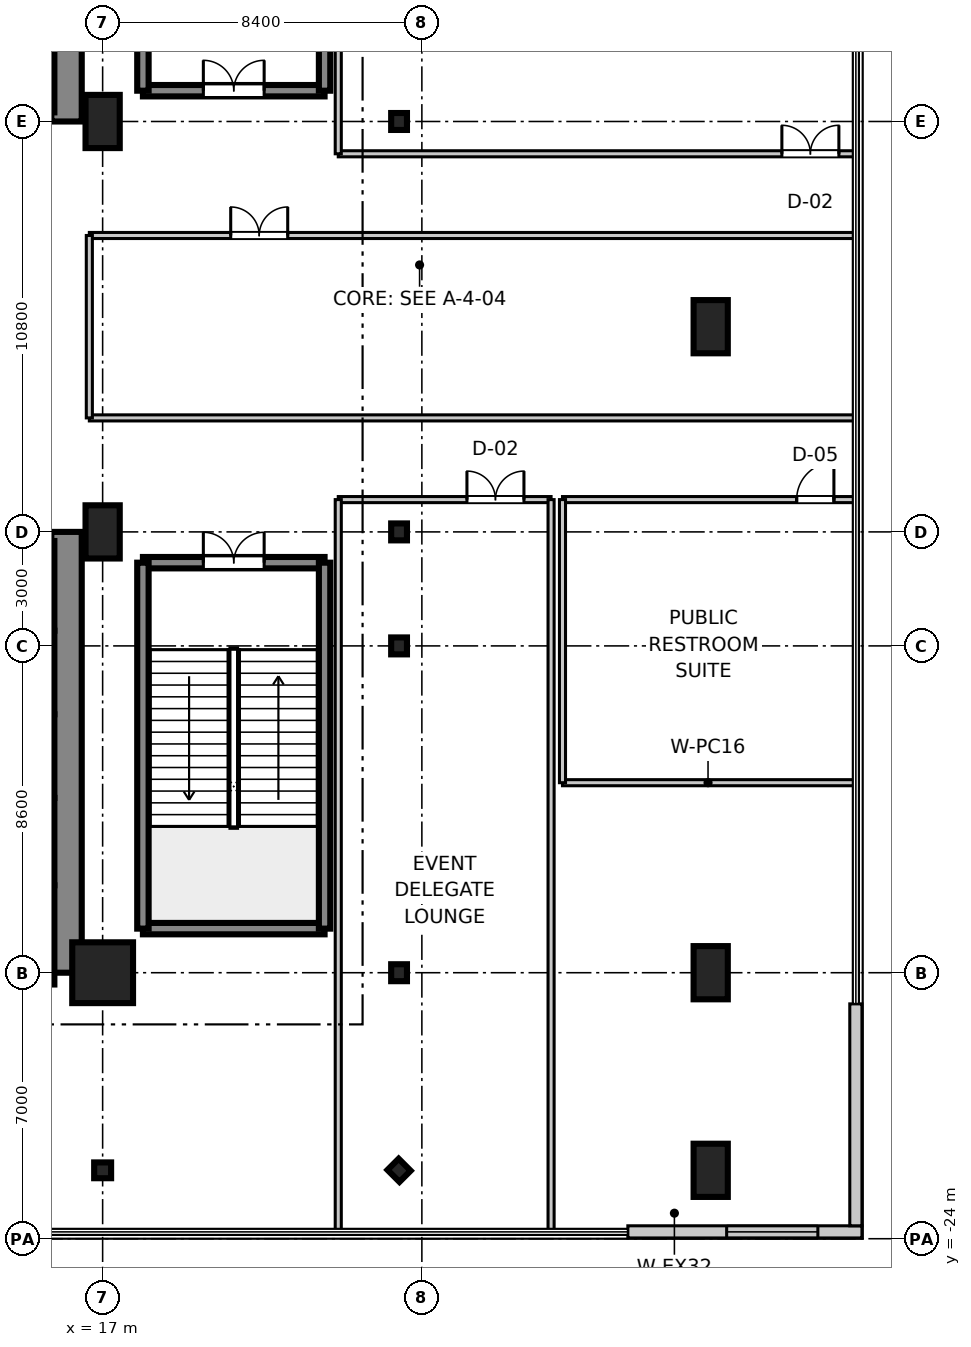
"""IFC4 building model, lengths in metres.
Left out: names, types, materials, properties, quantities, classifications, styles, units other than length and angle.
Written with IfcOpenShell. Run it as: python <this file> out.ifc"""

import sys

from ifc_helpers import new_model, si_unit, direction, frame, frame_2d, origin, origin_2d, place, context, subcontext, project, spatial, rectangle, i_section, extrude, source, transform, mapped, element, fill, save


model = new_model("IFC4")
c1 = context("Model", 3, precision=1e-05, world=origin(), true_north=direction((0.0, 1.0)))
c2 = subcontext(c1, "Body", "Model", "MODEL_VIEW")
j1 = project(units=[si_unit("LENGTHUNIT", "METRE"), si_unit("PLANEANGLEUNIT", "RADIAN")], contexts=[c1])
p1 = place(None, origin())
s1 = spatial("IfcSite", under=j1, at=p1, CompositionType="ELEMENT")
p2 = place(p1, origin())
s2 = spatial("IfcBuilding", under=s1, at=p2, CompositionType="ELEMENT")
p3 = place(p2, frame((0.0, 0.0, 10.8)))
s3 = spatial("IfcBuildingStorey", under=s2, at=p3, CompositionType="ELEMENT", Elevation=10.8)
m1 = source(origin(), c2, "Body", "SweptSolid", [
    extrude(rectangle(XDim=1.6, YDim=1.6, at=origin_2d()), origin(), (0.0, 0.0, 1.0), 5.355),
])
p4 = place(p3, frame((17.0, -17.0, 0.0), z_axis=(0.0, 0.0, 1.0), x_axis=(1.0, 0.0, 0.0)))
e1 = element("IfcColumn", 1, at=p4, inside=s3, PredefinedType="COLUMN", context=c2, shape_type="MappedRepresentation", body=[
    mapped(m1, transform((0.0, 0.0, 0.0), scale=1.0)),
])
m2 = source(origin(), c2, "Body", "SweptSolid", [
    extrude(rectangle(XDim=0.9, YDim=1.4, at=origin_2d()), origin(), (0.0, 0.0, 1.0), 5.355),
])
for number, where, z_axis, x_axis in (
    (2, (17.0, -5.4, 0.0), (0.0, 0.0, 1.0), (1.0, 0.0, 0.0)),
    (3, (17.0, 5.4, 0.0), (0.0, 0.0, 1.0), (1.0, 0.0, 0.0)),
    (4, (33.0, -22.2, 0.0), (0.0, 0.0, 1.0), (1.0, 0.0, 0.0)),
    (5, (33.0, -17.0, 0.0), (0.0, 0.0, 1.0), (1.0, 0.0, 0.0)),
    (6, (33.0, 0.0, 0.0), (0.0, 0.0, 1.0), (1.0, 0.0, 0.0)),
):
    element("IfcColumn", number, at=place(p3, frame(where, z_axis=z_axis, x_axis=x_axis)), inside=s3, PredefinedType="PILASTER", context=c2, shape_type="MappedRepresentation", body=[
        mapped(m2, transform((0.0, 0.0, 0.0), scale=1.0)),
    ])
m3 = source(origin(), c2, "Body", "SweptSolid", [
    extrude(i_section(OverallWidth=0.416, OverallDepth=0.446, WebThickness=0.025, FlangeThickness=0.04, at=origin_2d()), origin(), (0.0, 0.0, 1.0), 5.355),
])
for number, where, z_axis, x_axis in (
    (7, (24.8, -17.0, 0.0), (0.0, 0.0, 1.0), (1.0, 0.0, 0.0)),
    (8, (24.8, -8.4, 0.0), (0.0, 0.0, 1.0), (1.0, 0.0, 0.0)),
    (9, (24.8, -5.4, 0.0), (0.0, 0.0, 1.0), (1.0, 0.0, 0.0)),
    (10, (24.8, 5.4, 0.0), (0.0, 0.0, 1.0), (1.0, 0.0, 0.0)),
    (11, (17.0, -22.2, 0.0), (0.0, 0.0, 1.0), (0.0, 1.0, 0.0)),
    (12, (24.8, -22.2, 0.0), (0.0, 0.0, 1.0), (0.707, 0.707, 0.0)),
):
    element("IfcColumn", number, at=place(p3, frame(where, z_axis=z_axis, x_axis=x_axis)), inside=s3, PredefinedType="COLUMN", context=c2, shape_type="MappedRepresentation", body=[
        mapped(m3, transform((0.0, 0.0, 0.0), scale=1.0)),
    ])
m4 = source(origin(), c2, "Body", "SweptSolid", [
    extrude(rectangle(XDim=11.6, YDim=0.8, at=frame_2d((5.8, 0.0))), origin(), (0.0, 0.0, 1.0), 5.06),
])
for number, where, z_axis, x_axis in (
    (13, (16.05, 5.4, 0.0), (0.0, 0.0, 1.0), (0.0, 1.0, 0.0)),
    (14, (16.05, -17.0, 0.0), (0.0, 0.0, 1.0), (0.0, 1.0, 0.0)),
):
    element("IfcWall", number, at=place(p3, frame(where, z_axis=z_axis, x_axis=x_axis)), inside=s3, PredefinedType="SHEAR", context=c2, shape_type="MappedRepresentation", body=[
        mapped(m4, transform((0.0, 0.0, 0.0), scale=1.0)),
    ])
m5 = source(origin(), c2, "Body", "SweptSolid", [
    extrude(rectangle(XDim=4.78, YDim=0.3, at=frame_2d((2.39, 0.0))), origin(), (0.0, 0.0, 1.0), 5.06),
])
p5 = place(p3, frame((18.06, 6.21, 0.0), z_axis=(0.0, 0.0, 1.0), x_axis=(1.0, 0.0, 0.0)))
e15 = element("IfcWall", 15, at=p5, inside=s3, PredefinedType="SHEAR", context=c2, shape_type="MappedRepresentation", body=[
    mapped(m5, transform((0.0, 0.0, 0.0), scale=1.0)),
])
p6 = place(p5, frame((1.59, 0.0, 0.0)))
e16 = element("IfcOpeningElement", 16, at=p6, cuts=e15, PredefinedType="OPENING", context=c2, shape_type="SweptSolid", body=[
    extrude(rectangle(XDim=1.6, YDim=2.2, at=frame_2d((0.8, 1.1))), frame((0.0, 0.16, 0.0), z_axis=(0.0, -1.0, 0.0), x_axis=(1.0, 0.0, 0.0)), (0.0, 0.0, 1.0), 0.32),
])
m6 = source(origin(), c2, "Body", "SweptSolid", [
    extrude(rectangle(XDim=9.63, YDim=0.3, at=frame_2d((4.815, 0.0))), origin(), (0.0, 0.0, 1.0), 5.06),
])
for number, where, z_axis, x_axis in (
    (17, (18.06, 6.21, 0.0), (0.0, 0.0, 1.0), (0.0, 1.0, 0.0)),
    (18, (22.84, 6.21, 0.0), (0.0, 0.0, 1.0), (0.0, 1.0, 0.0)),
):
    element("IfcWall", number, at=place(p3, frame(where, z_axis=z_axis, x_axis=x_axis)), inside=s3, PredefinedType="SHEAR", context=c2, shape_type="MappedRepresentation", body=[
        mapped(m6, transform((0.0, 0.0, 0.0), scale=1.0)),
    ])
p7 = place(p3, frame((18.06, -15.84, 0.0), z_axis=(0.0, 0.0, 1.0), x_axis=(1.0, 0.0, 0.0)))
e19 = element("IfcWall", 19, at=p7, inside=s3, PredefinedType="SHEAR", context=c2, shape_type="MappedRepresentation", body=[
    mapped(m5, transform((0.0, 0.0, 0.0), scale=1.0)),
])
p8 = place(p3, frame((18.06, -6.21, 0.0), z_axis=(0.0, 0.0, 1.0), x_axis=(1.0, 0.0, 0.0)))
e20 = element("IfcWall", 20, at=p8, inside=s3, PredefinedType="SHEAR", context=c2, shape_type="MappedRepresentation", body=[
    mapped(m5, transform((0.0, 0.0, 0.0), scale=1.0)),
])
p9 = place(p8, frame((1.59, 0.0, 0.0)))
e21 = element("IfcOpeningElement", 21, at=p9, cuts=e20, PredefinedType="OPENING", context=c2, shape_type="SweptSolid", body=[
    extrude(rectangle(XDim=1.6, YDim=2.2, at=frame_2d((0.8, 1.1))), frame((0.0, 0.16, 0.0), z_axis=(0.0, -1.0, 0.0), x_axis=(1.0, 0.0, 0.0)), (0.0, 0.0, 1.0), 0.32),
])
for number, where, z_axis, x_axis in (
    (22, (18.06, -15.84, 0.0), (0.0, 0.0, 1.0), (0.0, 1.0, 0.0)),
    (23, (22.84, -15.84, 0.0), (0.0, 0.0, 1.0), (0.0, 1.0, 0.0)),
):
    element("IfcWall", number, at=place(p3, frame(where, z_axis=z_axis, x_axis=x_axis)), inside=s3, PredefinedType="SHEAR", context=c2, shape_type="MappedRepresentation", body=[
        mapped(m6, transform((0.0, 0.0, 0.0), scale=1.0)),
    ])
m7 = source(origin(), c2, "Body", "SweptSolid", [
    extrude(rectangle(XDim=2.36, YDim=0.22, at=frame_2d((1.18, 0.0))), origin(), (0.0, 0.0, 1.0), 5.06),
])
for number, where, z_axis, x_axis in (
    (24, (15.62, 5.64, 0.0), (0.0, 0.0, 1.0), (0.0, 1.0, 0.0)),
    (25, (15.62, -8.0, 0.0), (0.0, 0.0, 1.0), (0.0, 1.0, 0.0)),
):
    element("IfcWall", number, at=place(p3, frame(where, z_axis=z_axis, x_axis=x_axis)), inside=s3, PredefinedType="SHEAR", context=c2, shape_type="MappedRepresentation", body=[
        mapped(m7, transform((0.0, 0.0, 0.0), scale=1.0)),
    ])
m8 = source(origin(), c2, "Body", "SweptSolid", [
    extrude(rectangle(XDim=2.2, YDim=0.22, at=frame_2d((1.1, 0.0))), origin(), (0.0, 0.0, 1.0), 5.06),
])
for number, where, z_axis, x_axis in (
    (26, (15.62, -10.2, 0.0), (0.0, 0.0, 1.0), (0.0, 1.0, 0.0)),
    (27, (15.62, -12.4, 0.0), (0.0, 0.0, 1.0), (0.0, 1.0, 0.0)),
):
    element("IfcWall", number, at=place(p3, frame(where, z_axis=z_axis, x_axis=x_axis)), inside=s3, PredefinedType="SHEAR", context=c2, shape_type="MappedRepresentation", body=[
        mapped(m8, transform((0.0, 0.0, 0.0), scale=1.0)),
    ])
m9 = source(origin(), c2, "Body", "SweptSolid", [
    extrude(rectangle(XDim=2.3, YDim=0.22, at=frame_2d((1.15, 0.0))), origin(), (0.0, 0.0, 1.0), 5.06),
])
p10 = place(p3, frame((15.62, -14.7, 0.0), z_axis=(0.0, 0.0, 1.0), x_axis=(0.0, 1.0, 0.0)))
e28 = element("IfcWall", 28, at=p10, inside=s3, PredefinedType="SHEAR", context=c2, shape_type="MappedRepresentation", body=[
    mapped(m9, transform((0.0, 0.0, 0.0), scale=1.0)),
])
m10 = source(origin(), c2, "Body", "SweptSolid", [
    extrude(rectangle(XDim=2.61, YDim=0.22, at=frame_2d((1.305, 0.0))), origin(), (0.0, 0.0, 1.0), 5.06),
])
p11 = place(p3, frame((15.62, -17.31, 0.0), z_axis=(0.0, 0.0, 1.0), x_axis=(0.0, 1.0, 0.0)))
e29 = element("IfcWall", 29, at=p11, inside=s3, PredefinedType="SHEAR", context=c2, shape_type="MappedRepresentation", body=[
    mapped(m10, transform((0.0, 0.0, 0.0), scale=1.0)),
])
m11 = source(origin(), c2, "Body", "SweptSolid", [
    extrude(rectangle(XDim=6.16, YDim=0.32, at=frame_2d((3.08, 0.0))), origin(), (0.0, 0.0, 1.0), 5.06),
])
p12 = place(p3, frame((30.82, -23.82, 0.0), z_axis=(0.0, 0.0, 1.0), x_axis=(1.0, 0.0, 0.0)))
e30 = element("IfcWall", 30, at=p12, inside=s3, PredefinedType="STANDARD", context=c2, shape_type="MappedRepresentation", body=[
    mapped(m11, transform((0.0, 0.0, 0.0), scale=1.0)),
])
p13 = place(p12, frame((2.6, 0.0, 0.9)))
e31 = element("IfcOpeningElement", 31, at=p13, cuts=e30, PredefinedType="OPENING", context=c2, shape_type="SweptSolid", body=[
    extrude(rectangle(XDim=2.4, YDim=2.2, at=frame_2d((1.2, 1.1))), frame((0.0, 0.17, 0.0), z_axis=(0.0, -1.0, 0.0), x_axis=(1.0, 0.0, 0.0)), (0.0, 0.0, 1.0), 0.34),
])
m12 = source(origin(), c2, "Body", "SweptSolid", [
    extrude(rectangle(XDim=5.84, YDim=0.32, at=frame_2d((2.92, 0.0))), origin(), (0.0, 0.0, 1.0), 5.06),
])
p14 = place(p3, frame((36.82, -23.66, 0.0), z_axis=(0.0, 0.0, 1.0), x_axis=(0.0, 1.0, 0.0)))
e32 = element("IfcWall", 32, at=p14, inside=s3, PredefinedType="STANDARD", context=c2, shape_type="MappedRepresentation", body=[
    mapped(m12, transform((0.0, 0.0, 0.0), scale=1.0)),
])
m13 = source(origin(), c2, "Body", "SweptSolid", [
    extrude(rectangle(XDim=13.56, YDim=0.16, at=frame_2d((6.78, 0.0))), origin(), (0.0, 0.0, 1.0), 3.4),
])
p15 = place(p3, frame((23.2, 4.55, 0.0), z_axis=(0.0, 0.0, 1.0), x_axis=(1.0, 0.0, 0.0)))
e33 = element("IfcWall", 33, at=p15, inside=s3, PredefinedType="PARTITIONING", context=c2, shape_type="MappedRepresentation", body=[
    mapped(m13, transform((0.0, 0.0, 0.0), scale=1.0)),
])
p16 = place(p15, frame((11.673, 0.0, 0.0)))
e34 = element("IfcOpeningElement", 34, at=p16, cuts=e33, PredefinedType="OPENING", context=c2, shape_type="SweptSolid", body=[
    extrude(rectangle(XDim=1.5, YDim=2.15, at=frame_2d((0.75, 1.075))), frame((0.0, 0.09, 0.0), z_axis=(0.0, -1.0, 0.0), x_axis=(1.0, 0.0, 0.0)), (0.0, 0.0, 1.0), 0.18),
])
m14 = source(origin(), c2, "Body", "SweptSolid", [
    extrude(rectangle(XDim=19.21, YDim=0.16, at=frame_2d((9.605, 0.0))), origin(), (0.0, 0.0, 1.0), 3.4),
])
p17 = place(p3, frame((23.2, 4.55, 0.0), z_axis=(0.0, 0.0, 1.0), x_axis=(0.0, 1.0, 0.0)))
e35 = element("IfcWall", 35, at=p17, inside=s3, PredefinedType="PARTITIONING", context=c2, shape_type="MappedRepresentation", body=[
    mapped(m14, transform((0.0, 0.0, 0.0), scale=1.0)),
])
m15 = source(origin(), c2, "Body", "SweptSolid", [
    extrude(rectangle(XDim=20.11, YDim=0.16, at=frame_2d((10.055, 0.0))), origin(), (0.0, 0.0, 1.0), 3.4),
])
p18 = place(p3, frame((16.65, -2.4, 0.0), z_axis=(0.0, 0.0, 1.0), x_axis=(1.0, 0.0, 0.0)))
e36 = element("IfcWall", 36, at=p18, inside=s3, PredefinedType="PARTITIONING", context=c2, shape_type="MappedRepresentation", body=[
    mapped(m15, transform((0.0, 0.0, 0.0), scale=1.0)),
])
p19 = place(p3, frame((16.65, 2.4, 0.0), z_axis=(0.0, 0.0, 1.0), x_axis=(1.0, 0.0, 0.0)))
e37 = element("IfcWall", 37, at=p19, inside=s3, PredefinedType="PARTITIONING", context=c2, shape_type="MappedRepresentation", body=[
    mapped(m15, transform((0.0, 0.0, 0.0), scale=1.0)),
])
p20 = place(p19, frame((3.72, 0.0, 0.0)))
e38 = element("IfcOpeningElement", 38, at=p20, cuts=e37, PredefinedType="OPENING", context=c2, shape_type="SweptSolid", body=[
    extrude(rectangle(XDim=1.5, YDim=2.15, at=frame_2d((0.75, 1.075))), frame((0.0, 0.09, 0.0), z_axis=(0.0, -1.0, 0.0), x_axis=(1.0, 0.0, 0.0)), (0.0, 0.0, 1.0), 0.18),
])
m16 = source(origin(), c2, "Body", "SweptSolid", [
    extrude(rectangle(XDim=4.8, YDim=0.16, at=frame_2d((2.4, 0.0))), origin(), (0.0, 0.0, 1.0), 3.4),
])
p21 = place(p3, frame((16.65, -2.4, 0.0), z_axis=(0.0, 0.0, 1.0), x_axis=(0.0, 1.0, 0.0)))
e39 = element("IfcWall", 39, at=p21, inside=s3, PredefinedType="PARTITIONING", context=c2, shape_type="MappedRepresentation", body=[
    mapped(m16, transform((0.0, 0.0, 0.0), scale=1.0)),
])
m17 = source(origin(), c2, "Body", "SweptSolid", [
    extrude(rectangle(XDim=5.6, YDim=0.16, at=frame_2d((2.8, 0.0))), origin(), (0.0, 0.0, 1.0), 3.4),
])
p22 = place(p3, frame((23.2, -4.55, 0.0), z_axis=(0.0, 0.0, 1.0), x_axis=(1.0, 0.0, 0.0)))
e40 = element("IfcWall", 40, at=p22, inside=s3, PredefinedType="PARTITIONING", context=c2, shape_type="MappedRepresentation", body=[
    mapped(m17, transform((0.0, 0.0, 0.0), scale=1.0)),
])
p23 = place(p22, frame((3.386, 0.0, 0.0)))
e41 = element("IfcOpeningElement", 41, at=p23, cuts=e40, PredefinedType="OPENING", context=c2, shape_type="SweptSolid", body=[
    extrude(rectangle(XDim=1.5, YDim=2.15, at=frame_2d((0.75, 1.075))), frame((0.0, 0.09, 0.0), z_axis=(0.0, -1.0, 0.0), x_axis=(1.0, 0.0, 0.0)), (0.0, 0.0, 1.0), 0.18),
])
for number, where, z_axis, x_axis in (
    (42, (23.2, -23.76, 0.0), (0.0, 0.0, 1.0), (0.0, 1.0, 0.0)),
    (43, (28.8, -23.76, 0.0), (0.0, 0.0, 1.0), (0.0, 1.0, 0.0)),
):
    element("IfcWall", number, at=place(p3, frame(where, z_axis=z_axis, x_axis=x_axis)), inside=s3, PredefinedType="PARTITIONING", context=c2, shape_type="MappedRepresentation", body=[
        mapped(m14, transform((0.0, 0.0, 0.0), scale=1.0)),
    ])
m18 = source(origin(), c2, "Body", "SweptSolid", [
    extrude(rectangle(XDim=7.66, YDim=0.16, at=frame_2d((3.83, 0.0))), origin(), (0.0, 0.0, 1.0), 3.4),
])
p24 = place(p3, frame((29.1, -12.0, 0.0), z_axis=(0.0, 0.0, 1.0), x_axis=(1.0, 0.0, 0.0)))
e44 = element("IfcWall", 44, at=p24, inside=s3, PredefinedType="PARTITIONING", context=c2, shape_type="MappedRepresentation", body=[
    mapped(m18, transform((0.0, 0.0, 0.0), scale=1.0)),
])
p25 = place(p3, frame((29.1, -4.55, 0.0), z_axis=(0.0, 0.0, 1.0), x_axis=(1.0, 0.0, 0.0)))
e45 = element("IfcWall", 45, at=p25, inside=s3, PredefinedType="PARTITIONING", context=c2, shape_type="MappedRepresentation", body=[
    mapped(m18, transform((0.0, 0.0, 0.0), scale=1.0)),
])
p26 = place(p25, frame((6.162, 0.0, 0.0)))
e46 = element("IfcOpeningElement", 46, at=p26, cuts=e45, PredefinedType="OPENING", context=c2, shape_type="SweptSolid", body=[
    extrude(rectangle(XDim=0.98, YDim=2.1, at=frame_2d((0.49, 1.05))), frame((0.0, 0.09, 0.0), z_axis=(0.0, -1.0, 0.0), x_axis=(1.0, 0.0, 0.0)), (0.0, 0.0, 1.0), 0.18),
])
m19 = source(origin(), c2, "Body", "SweptSolid", [
    extrude(rectangle(XDim=7.45, YDim=0.16, at=frame_2d((3.725, 0.0))), origin(), (0.0, 0.0, 1.0), 3.4),
])
p27 = place(p3, frame((29.1, -12.0, 0.0), z_axis=(0.0, 0.0, 1.0), x_axis=(0.0, 1.0, 0.0)))
e47 = element("IfcWall", 47, at=p27, inside=s3, PredefinedType="PARTITIONING", context=c2, shape_type="MappedRepresentation", body=[
    mapped(m19, transform((0.0, 0.0, 0.0), scale=1.0)),
])
m20 = source(origin(), c2, "Body", "SweptSolid", [
    extrude(rectangle(XDim=1.6, YDim=2.2, at=frame_2d((0.8, 1.1))), frame((0.0, 0.025, 0.0), z_axis=(0.0, -1.0, 0.0), x_axis=(1.0, 0.0, 0.0)), (0.0, 0.0, 1.0), 0.05),
])
p28 = place(p6, origin())
e48 = element("IfcDoor", 48, at=p28, inside=s3, OperationType="DOUBLE_DOOR_SINGLE_SWING", PredefinedType="DOOR", context=c2, shape_type="MappedRepresentation", body=[
    mapped(m20, transform((0.0, 0.0, 0.0), scale=1.0)),
])
fill(e16, e48)
p29 = place(p9, frame((1.6, 0.0, 0.0), z_axis=(0.0, 0.0, 1.0), x_axis=(-1.0, 0.0, 0.0)))
e49 = element("IfcDoor", 49, at=p29, inside=s3, OperationType="DOUBLE_DOOR_SINGLE_SWING", PredefinedType="DOOR", context=c2, shape_type="MappedRepresentation", body=[
    mapped(m20, transform((0.0, 0.0, 0.0), scale=1.0)),
])
fill(e21, e49)
m21 = source(origin(), c2, "Body", "SweptSolid", [
    extrude(rectangle(XDim=2.4, YDim=2.2, at=frame_2d((1.2, 1.1))), frame((0.0, 0.03, 0.0), z_axis=(0.0, -1.0, 0.0), x_axis=(1.0, 0.0, 0.0)), (0.0, 0.0, 1.0), 0.06),
])
p30 = place(p13, origin())
e50 = element("IfcWindow", 50, at=p30, inside=s3, PartitioningType="SINGLE_PANEL", PredefinedType="WINDOW", context=c2, shape_type="MappedRepresentation", body=[
    mapped(m21, transform((0.0, 0.0, 0.0), scale=1.0)),
])
fill(e31, e50)
m22 = source(origin(), c2, "Body", "SweptSolid", [
    extrude(rectangle(XDim=1.5, YDim=2.15, at=frame_2d((0.75, 1.075))), frame((0.0, 0.025, 0.0), z_axis=(0.0, -1.0, 0.0), x_axis=(1.0, 0.0, 0.0)), (0.0, 0.0, 1.0), 0.05),
])
p31 = place(p16, origin())
e51 = element("IfcDoor", 51, at=p31, inside=s3, OperationType="DOUBLE_DOOR_SINGLE_SWING", PredefinedType="DOOR", context=c2, shape_type="MappedRepresentation", body=[
    mapped(m22, transform((0.0, 0.0, 0.0), scale=1.0)),
])
fill(e34, e51)
p32 = place(p20, frame((1.5, 0.0, 0.0), z_axis=(0.0, 0.0, 1.0), x_axis=(-1.0, 0.0, 0.0)))
e52 = element("IfcDoor", 52, at=p32, inside=s3, OperationType="DOUBLE_DOOR_SINGLE_SWING", PredefinedType="DOOR", context=c2, shape_type="MappedRepresentation", body=[
    mapped(m22, transform((0.0, 0.0, 0.0), scale=1.0)),
])
fill(e38, e52)
p33 = place(p23, frame((1.5, 0.0, 0.0), z_axis=(0.0, 0.0, 1.0), x_axis=(-1.0, 0.0, 0.0)))
e53 = element("IfcDoor", 53, at=p33, inside=s3, OperationType="DOUBLE_DOOR_SINGLE_SWING", PredefinedType="DOOR", context=c2, shape_type="MappedRepresentation", body=[
    mapped(m22, transform((0.0, 0.0, 0.0), scale=1.0)),
])
fill(e41, e53)
m23 = source(origin(), c2, "Body", "SweptSolid", [
    extrude(rectangle(XDim=0.98, YDim=2.1, at=frame_2d((0.49, 1.05))), frame((0.0, 0.025, 0.0), z_axis=(0.0, -1.0, 0.0), x_axis=(1.0, 0.0, 0.0)), (0.0, 0.0, 1.0), 0.05),
])
p34 = place(p26, frame((0.98, 0.0, 0.0), z_axis=(0.0, 0.0, 1.0), x_axis=(-1.0, 0.0, 0.0)))
e54 = element("IfcDoor", 54, at=p34, inside=s3, OperationType="SINGLE_SWING_RIGHT", PredefinedType="DOOR", context=c2, shape_type="MappedRepresentation", body=[
    mapped(m23, transform((0.0, 0.0, 0.0), scale=1.0)),
])
fill(e46, e54)
save(model, sys.argv[1])
